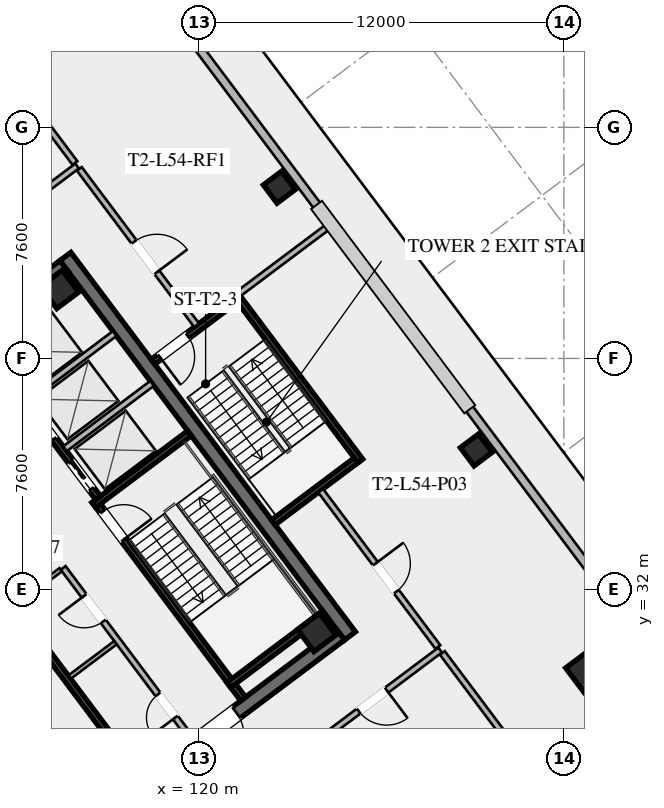
"""IFC4 building model, lengths in metres.
Left out: names, types, materials, properties, quantities, classifications, styles, units other than length and angle.
Written with IfcOpenShell. Run it as: python <this file> out.ifc"""

import sys

from ifc_helpers import new_model, si_unit, direction, frame, frame_2d, origin, origin_2d, place, context, subcontext, project, spatial, rectangle, hollow_rectangle, extrude, element, fill, save


model = new_model("IFC4")
c1 = context("Model", 3, precision=1e-05, world=origin(), true_north=direction((0.0, 1.0)))
c2 = subcontext(c1, "Body", "Model", "MODEL_VIEW")
j1 = project(units=[si_unit("LENGTHUNIT", "METRE"), si_unit("PLANEANGLEUNIT", "RADIAN")], contexts=[c1])
p1 = place(None, origin())
s1 = spatial("IfcSite", under=j1, at=p1, CompositionType="ELEMENT")
p2 = place(p1, origin())
s2 = spatial("IfcBuilding", under=s1, at=p2, CompositionType="ELEMENT")
p3 = place(p2, frame((0.0, 0.0, 199.6)))
s3 = spatial("IfcBuildingStorey", under=s2, at=p3, CompositionType="ELEMENT", Elevation=199.6)
p4 = place(p3, frame((115.604, 42.953, 0.0), z_axis=(0.0, 0.0, 1.0), x_axis=(0.600005007985, -0.799996243986, 0.0)))
e1 = element("IfcWall", 1, at=p4, inside=s3, PredefinedType="SHEAR", context=c2, shape_type="SweptSolid", body=[
    extrude(rectangle(XDim=15.6, YDim=0.45, at=frame_2d((7.8, 0.0))), origin(), (0.0, 0.0, 1.0), 4.6),
])
p5 = place(p3, frame((124.649, 30.518, 0.0), z_axis=(0.0, 0.0, 1.0), x_axis=(-0.8, -0.6, 0.0)))
e2 = element("IfcWall", 2, at=p5, inside=s3, PredefinedType="SHEAR", context=c2, shape_type="SweptSolid", body=[
    extrude(rectangle(XDim=15.26, YDim=0.45, at=frame_2d((7.63, 0.0))), origin(), (0.0, 0.0, 1.0), 4.6),
])
p6 = place(p5, frame((9.33, 0.0, 0.0)))
e3 = element("IfcOpeningElement", 3, at=p6, cuts=e2, PredefinedType="OPENING", context=c2, shape_type="SweptSolid", body=[
    extrude(rectangle(XDim=1.25, YDim=2.25, at=frame_2d((0.625, 1.125))), frame((0.0, 0.235, 0.0), z_axis=(0.0, -1.0, 0.0), x_axis=(1.0, 0.0, 0.0)), (0.0, 0.0, 1.0), 0.47),
])
p7 = place(p5, frame((4.28, 0.0, 0.0)))
e4 = element("IfcOpeningElement", 4, at=p7, cuts=e2, PredefinedType="OPENING", context=c2, shape_type="SweptSolid", body=[
    extrude(rectangle(XDim=1.25, YDim=2.25, at=frame_2d((0.625, 1.125))), frame((0.0, 0.235, 0.0), z_axis=(0.0, -1.0, 0.0), x_axis=(1.0, 0.0, 0.0)), (0.0, 0.0, 1.0), 0.47),
])
p8 = place(p3, frame((103.351, 33.482, 0.0), z_axis=(0.0, 0.0, 1.0), x_axis=(0.8, 0.6, 0.0)))
e5 = element("IfcWall", 5, at=p8, inside=s3, PredefinedType="SHEAR", context=c2, shape_type="SweptSolid", body=[
    extrude(rectangle(XDim=15.26, YDim=0.45, at=frame_2d((7.63, 0.0))), origin(), (0.0, 0.0, 1.0), 4.6),
])
p9 = place(p8, frame((4.68, 0.0, 0.0)))
e6 = element("IfcOpeningElement", 6, at=p9, cuts=e5, PredefinedType="OPENING", context=c2, shape_type="SweptSolid", body=[
    extrude(rectangle(XDim=1.25, YDim=2.25, at=frame_2d((0.625, 1.125))), frame((0.0, 0.235, 0.0), z_axis=(0.0, -1.0, 0.0), x_axis=(1.0, 0.0, 0.0)), (0.0, 0.0, 1.0), 0.47),
])
p10 = place(p8, frame((9.73, 0.0, 0.0)))
e7 = element("IfcOpeningElement", 7, at=p10, cuts=e5, PredefinedType="OPENING", context=c2, shape_type="SweptSolid", body=[
    extrude(rectangle(XDim=1.25, YDim=2.25, at=frame_2d((0.625, 1.125))), frame((0.0, 0.235, 0.0), z_axis=(0.0, -1.0, 0.0), x_axis=(1.0, 0.0, 0.0)), (0.0, 0.0, 1.0), 0.47),
])
for number, where, z_axis, x_axis in (
    (8, (123.87, 30.59, 0.0), (0.0, 0.0, 1.0), (0.8, 0.6, 0.0)),
    (9, (115.41, 41.87, 0.0), (0.0, 0.0, 1.0), (0.8, 0.6, 0.0)),
):
    element("IfcColumn", number, at=place(p3, frame(where, z_axis=z_axis, x_axis=x_axis)), inside=s3, PredefinedType="COLUMN", context=c2, shape_type="SweptSolid", body=[
        extrude(hollow_rectangle(XDim=0.9, YDim=0.9, WallThickness=0.04, at=origin_2d()), origin(), (0.0, 0.0, 1.0), 4.42),
    ])
p11 = place(p3, frame((132.76, 29.32, -0.295), z_axis=(0.0, 0.0, 1.0), x_axis=(0.799999996291, 0.600000004945, 0.0)))
e10 = element("IfcColumn", 10, at=p11, inside=s3, PredefinedType="COLUMN", context=c2, shape_type="SweptSolid", body=[
    extrude(hollow_rectangle(XDim=1.0, YDim=1.0, WallThickness=0.04, at=origin_2d()), origin(), (0.0, 0.0, 1.0), 4.715),
])
for number, where, z_axis, x_axis in (
    (11, (129.12, 36.59, -0.295), (0.0, 0.0, 1.0), (0.8, 0.6, 0.0)),
    (12, (122.64, 45.23, -0.295), (0.0, 0.0, 1.0), (0.8, 0.6, 0.0)),
):
    element("IfcColumn", number, at=place(p3, frame(where, z_axis=z_axis, x_axis=x_axis)), inside=s3, PredefinedType="COLUMN", context=c2, shape_type="SweptSolid", body=[
        extrude(hollow_rectangle(XDim=0.75, YDim=0.75, WallThickness=0.032, at=origin_2d()), origin(), (0.0, 0.0, 1.0), 4.715),
    ])
for number, where, z_axis, x_axis in (
    (13, (134.072, 27.704, 0.0), (0.0, 0.0, 1.0), (-0.8, -0.6, 0.0)),
    (14, (93.928, 36.296, 0.0), (0.0, 0.0, 1.0), (0.8, 0.6, 0.0)),
    (15, (118.296, 52.072, 0.0), (0.0, 0.0, 1.0), (0.6, -0.8, 0.0)),
):
    element("IfcWall", number, at=place(p3, frame(where, z_axis=z_axis, x_axis=x_axis)), inside=s3, PredefinedType="SOLIDWALL", context=c2, shape_type="SweptSolid", body=[
        extrude(rectangle(XDim=26.96, YDim=0.28, at=frame_2d((13.48, 0.0))), origin(), (0.0, 0.0, 1.0), 4.42),
    ])
p12 = place(p3, frame((116.56, 34.92, 0.0), z_axis=(0.0, 0.0, 1.0), x_axis=(0.59999041401, -0.800007189403, 0.0)))
e16 = element("IfcWall", 16, at=p12, inside=s3, PredefinedType="SHEAR", context=c2, shape_type="SweptSolid", body=[
    extrude(rectangle(XDim=8.15, YDim=0.2, at=frame_2d((4.075, 0.0))), origin(), (0.0, 0.0, 1.0), 4.42),
])
p13 = place(p12, frame((0.45, 0.0, 0.0)))
e17 = element("IfcOpeningElement", 17, at=p13, cuts=e16, PredefinedType="OPENING", context=c2, shape_type="SweptSolid", body=[
    extrude(rectangle(XDim=1.15, YDim=2.2, at=frame_2d((0.575, 1.1))), frame((0.0, 0.11, 0.0), z_axis=(0.0, -1.0, 0.0), x_axis=(1.0, 0.0, 0.0)), (0.0, 0.0, 1.0), 0.22),
])
for number, where, z_axis, x_axis in (
    (18, (116.54, 34.78, 0.0), (0.0, 0.0, 1.0), (0.8, 0.6, 0.0)),
    (19, (120.98, 28.86, 0.0), (0.0, 0.0, 1.0), (0.8, 0.6, 0.0)),
):
    element("IfcWall", number, at=place(p3, frame(where, z_axis=z_axis, x_axis=x_axis)), inside=s3, PredefinedType="SHEAR", context=c2, shape_type="SweptSolid", body=[
        extrude(rectangle(XDim=3.93, YDim=0.2, at=frame_2d((1.965, 0.0))), origin(), (0.0, 0.0, 1.0), 4.42),
    ])
p14 = place(p3, frame((118.058, 25.856, 0.0), z_axis=(0.0, 0.0, 1.0), x_axis=(-0.600002657301, 0.799998007018, 0.0)))
e20 = element("IfcWall", 20, at=p14, inside=s3, PredefinedType="SHEAR", context=c2, shape_type="SweptSolid", body=[
    extrude(rectangle(XDim=14.7, YDim=0.2, at=frame_2d((7.35, 0.0))), origin(), (0.0, 0.0, 1.0), 4.42),
])
p15 = place(p3, frame((115.25, 23.75, 0.0), z_axis=(0.0, 0.0, 1.0), x_axis=(-0.599994036198, 0.800004472816, 0.0)))
e21 = element("IfcWall", 21, at=p15, inside=s3, PredefinedType="SHEAR", context=c2, shape_type="SweptSolid", body=[
    extrude(rectangle(XDim=6.55, YDim=0.2, at=frame_2d((3.275, 0.0))), origin(), (0.0, 0.0, 1.0), 4.42),
])
p16 = place(p15, frame((4.975, 0.0, 0.0)))
e22 = element("IfcOpeningElement", 22, at=p16, cuts=e21, PredefinedType="OPENING", context=c2, shape_type="SweptSolid", body=[
    extrude(rectangle(XDim=1.3, YDim=2.25, at=frame_2d((0.65, 1.125))), frame((0.0, 0.11, 0.0), z_axis=(0.0, -1.0, 0.0), x_axis=(1.0, 0.0, 0.0)), (0.0, 0.0, 1.0), 0.22),
])
p17 = place(p15, frame((2.975, 0.0, 0.0)))
e23 = element("IfcOpeningElement", 23, at=p17, cuts=e21, PredefinedType="OPENING", context=c2, shape_type="SweptSolid", body=[
    extrude(rectangle(XDim=1.3, YDim=2.25, at=frame_2d((0.65, 1.125))), frame((0.0, 0.11, 0.0), z_axis=(0.0, -1.0, 0.0), x_axis=(1.0, 0.0, 0.0)), (0.0, 0.0, 1.0), 0.22),
])
p18 = place(p15, frame((0.775, 0.0, 0.0)))
e24 = element("IfcOpeningElement", 24, at=p18, cuts=e21, PredefinedType="OPENING", context=c2, shape_type="SweptSolid", body=[
    extrude(rectangle(XDim=1.3, YDim=2.25, at=frame_2d((0.65, 1.125))), frame((0.0, 0.11, 0.0), z_axis=(0.0, -1.0, 0.0), x_axis=(1.0, 0.0, 0.0)), (0.0, 0.0, 1.0), 0.22),
])
p19 = place(p3, frame((112.75, 40.25, 0.0), z_axis=(0.0, 0.0, 1.0), x_axis=(0.599994036198, -0.800004472816, 0.0)))
e25 = element("IfcWall", 25, at=p19, inside=s3, PredefinedType="SHEAR", context=c2, shape_type="SweptSolid", body=[
    extrude(rectangle(XDim=6.55, YDim=0.2, at=frame_2d((3.275, 0.0))), origin(), (0.0, 0.0, 1.0), 4.42),
])
p20 = place(p19, frame((5.075, 0.0, 0.0)))
e26 = element("IfcOpeningElement", 26, at=p20, cuts=e25, PredefinedType="OPENING", context=c2, shape_type="SweptSolid", body=[
    extrude(rectangle(XDim=1.1, YDim=2.2, at=frame_2d((0.55, 1.1))), frame((0.0, 0.11, 0.0), z_axis=(0.0, -1.0, 0.0), x_axis=(1.0, 0.0, 0.0)), (0.0, 0.0, 1.0), 0.22),
])
p21 = place(p19, frame((3.025, 0.0, 0.0)))
e27 = element("IfcOpeningElement", 27, at=p21, cuts=e25, PredefinedType="OPENING", context=c2, shape_type="SweptSolid", body=[
    extrude(rectangle(XDim=1.1, YDim=2.2, at=frame_2d((0.55, 1.1))), frame((0.0, 0.11, 0.0), z_axis=(0.0, -1.0, 0.0), x_axis=(1.0, 0.0, 0.0)), (0.0, 0.0, 1.0), 0.22),
])
p22 = place(p19, frame((1.025, 0.0, 0.0)))
e28 = element("IfcOpeningElement", 28, at=p22, cuts=e25, PredefinedType="OPENING", context=c2, shape_type="SweptSolid", body=[
    extrude(rectangle(XDim=1.1, YDim=2.2, at=frame_2d((0.55, 1.1))), frame((0.0, 0.11, 0.0), z_axis=(0.0, -1.0, 0.0), x_axis=(1.0, 0.0, 0.0)), (0.0, 0.0, 1.0), 0.22),
])
for number, where, z_axis, x_axis in (
    (29, (115.59, 36.63, 0.0), (0.0, 0.0, 1.0), (0.8, 0.6, 0.0)),
    (30, (114.36, 38.27, 0.0), (0.0, 0.0, 1.0), (0.8, 0.6, 0.0)),
):
    element("IfcWall", number, at=place(p3, frame(where, z_axis=z_axis, x_axis=x_axis)), inside=s3, PredefinedType="SOLIDWALL", context=c2, shape_type="SweptSolid", body=[
        extrude(rectangle(XDim=3.58, YDim=0.2, at=frame_2d((1.79, 0.0))), origin(), (0.0, 0.0, 1.0), 4.42),
    ])
p23 = place(p3, frame((119.73, 27.11, 0.0), z_axis=(0.0, 0.0, 1.0), x_axis=(-0.600005580459, 0.799995814625, 0.0)))
e31 = element("IfcWall", 31, at=p23, inside=s3, PredefinedType="SOLIDWALL", context=c2, shape_type="SweptSolid", body=[
    extrude(rectangle(XDim=7.0, YDim=0.2, at=frame_2d((3.5, 0.0))), origin(), (0.0, 0.0, 1.0), 3.531),
])
p24 = place(p23, frame((0.85, 0.0, 0.0)))
e32 = element("IfcOpeningElement", 32, at=p24, cuts=e31, PredefinedType="OPENING", context=c2, shape_type="SweptSolid", body=[
    extrude(rectangle(XDim=0.95, YDim=2.05, at=frame_2d((0.475, 1.025))), frame((0.0, 0.11, 0.0), z_axis=(0.0, -1.0, 0.0), x_axis=(1.0, 0.0, 0.0)), (0.0, 0.0, 1.0), 0.22),
])
p25 = place(p23, frame((4.8, 0.0, 0.0)))
e33 = element("IfcOpeningElement", 33, at=p25, cuts=e31, PredefinedType="OPENING", context=c2, shape_type="SweptSolid", body=[
    extrude(rectangle(XDim=1.05, YDim=2.2, at=frame_2d((0.525, 1.1))), frame((0.0, 0.11, 0.0), z_axis=(0.0, -1.0, 0.0), x_axis=(1.0, 0.0, 0.0)), (0.0, 0.0, 1.0), 0.22),
])
for number, where, z_axis, x_axis in (
    (34, (113.946, 31.522, 0.0), (0.0, 0.0, 1.0), (0.8, 0.6, 0.0)),
    (35, (115.746, 29.122, 0.0), (0.0, 0.0, 1.0), (0.8, 0.6, 0.0)),
):
    element("IfcWall", number, at=place(p3, frame(where, z_axis=z_axis, x_axis=x_axis)), inside=s3, PredefinedType="PARTITIONING", context=c2, shape_type="SweptSolid", body=[
        extrude(rectangle(XDim=1.88, YDim=0.135, at=frame_2d((0.94, 0.0))), origin(), (0.0, 0.0, 1.0), 3.531),
    ])
p26 = place(p3, frame((115.11, 33.27, 0.0), z_axis=(0.0, 0.0, 1.0), x_axis=(-0.600011160345, 0.79999162962, 0.0)))
e36 = element("IfcWall", 36, at=p26, inside=s3, PredefinedType="SOLIDWALL", context=c2, shape_type="SweptSolid", body=[
    extrude(rectangle(XDim=7.0, YDim=0.2, at=frame_2d((3.5, 0.0))), origin(), (0.0, 0.0, 1.0), 4.42),
])
p27 = place(p3, frame((125.304, 36.228, 0.0), z_axis=(0.0, 0.0, 1.0), x_axis=(-0.59998851072, 0.800008616831, 0.0)))
e37 = element("IfcWall", 37, at=p27, inside=s3, PredefinedType="SHEAR", context=c2, shape_type="SweptSolid", body=[
    extrude(rectangle(XDim=6.8, YDim=0.2, at=frame_2d((3.4, 0.0))), origin(), (0.0, 0.0, 1.0), 4.42),
])
p28 = place(p3, frame((121.204, 41.528, 0.0), z_axis=(0.0, 0.0, 1.0), x_axis=(-0.800017232136, -0.599977023131, 0.0)))
e38 = element("IfcWall", 38, at=p28, inside=s3, PredefinedType="SHEAR", context=c2, shape_type="SweptSolid", body=[
    extrude(rectangle(XDim=3.4, YDim=0.2, at=frame_2d((1.7, 0.0))), origin(), (0.0, 0.0, 1.0), 4.42),
])
p29 = place(p28, frame((1.975, 0.0, 0.0)))
e39 = element("IfcOpeningElement", 39, at=p29, cuts=e38, PredefinedType="OPENING", context=c2, shape_type="SweptSolid", body=[
    extrude(rectangle(XDim=1.15, YDim=2.2, at=frame_2d((0.575, 1.1))), frame((0.0, 0.11, 0.0), z_axis=(0.0, -1.0, 0.0), x_axis=(1.0, 0.0, 0.0)), (0.0, 0.0, 1.0), 0.22),
])
p30 = place(p3, frame((122.444, 34.208, 0.0), z_axis=(0.0, 0.0, 1.0), x_axis=(0.79999138319, 0.600011488909, 0.0)))
e40 = element("IfcWall", 40, at=p30, inside=s3, PredefinedType="SHEAR", context=c2, shape_type="SweptSolid", body=[
    extrude(rectangle(XDim=3.4, YDim=0.2, at=frame_2d((1.7, 0.0))), origin(), (0.0, 0.0, 1.0), 4.42),
])
p31 = place(p3, frame((100.07, 33.99, 0.0), z_axis=(0.0, 0.0, 1.0), x_axis=(0.8, 0.6, 0.0)))
e41 = element("IfcWall", 41, at=p31, inside=s3, PredefinedType="SOLIDWALL", context=c2, shape_type="SweptSolid", body=[
    extrude(rectangle(XDim=19.9, YDim=0.2, at=frame_2d((9.95, 0.0))), origin(), (0.0, 0.0, 1.0), 3.531),
])
p32 = place(p31, frame((2.2, 0.0, 0.0)))
e42 = element("IfcOpeningElement", 42, at=p32, cuts=e41, PredefinedType="OPENING", context=c2, shape_type="SweptSolid", body=[
    extrude(rectangle(XDim=1.15, YDim=2.2, at=frame_2d((0.575, 1.1))), frame((0.0, 0.11, 0.0), z_axis=(0.0, -1.0, 0.0), x_axis=(1.0, 0.0, 0.0)), (0.0, 0.0, 1.0), 0.22),
])
p33 = place(p3, frame((127.93, 30.01, 0.0), z_axis=(0.0, 0.0, 1.0), x_axis=(-0.8, -0.6, 0.0)))
e43 = element("IfcWall", 43, at=p33, inside=s3, PredefinedType="SOLIDWALL", context=c2, shape_type="SweptSolid", body=[
    extrude(rectangle(XDim=19.9, YDim=0.2, at=frame_2d((9.95, 0.0))), origin(), (0.0, 0.0, 1.0), 3.531),
])
p34 = place(p33, frame((2.2, 0.0, 0.0)))
e44 = element("IfcOpeningElement", 44, at=p34, cuts=e43, PredefinedType="OPENING", context=c2, shape_type="SweptSolid", body=[
    extrude(rectangle(XDim=1.15, YDim=2.2, at=frame_2d((0.575, 1.1))), frame((0.0, 0.11, 0.0), z_axis=(0.0, -1.0, 0.0), x_axis=(1.0, 0.0, 0.0)), (0.0, 0.0, 1.0), 0.22),
])
p35 = place(p3, frame((116.062, 45.834, 0.0), z_axis=(0.0, 0.0, 1.0), x_axis=(0.599987849816, -0.800009112494, 0.0)))
e45 = element("IfcWall", 45, at=p35, inside=s3, PredefinedType="SOLIDWALL", context=c2, shape_type="SweptSolid", body=[
    extrude(rectangle(XDim=6.43, YDim=0.2, at=frame_2d((3.215, 0.0))), origin(), (0.0, 0.0, 1.0), 3.531),
])
p36 = place(p35, frame((3.0, 0.0, 0.0)))
e46 = element("IfcOpeningElement", 46, at=p36, cuts=e45, PredefinedType="OPENING", context=c2, shape_type="SweptSolid", body=[
    extrude(rectangle(XDim=1.25, YDim=2.25, at=frame_2d((0.625, 1.125))), frame((0.0, 0.11, 0.0), z_axis=(0.0, -1.0, 0.0), x_axis=(1.0, 0.0, 0.0)), (0.0, 0.0, 1.0), 0.22),
])
p37 = place(p3, frame((124.0, 35.25, 0.0), z_axis=(0.0, 0.0, 1.0), x_axis=(0.599987849816, -0.800009112494, 0.0)))
e47 = element("IfcWall", 47, at=p37, inside=s3, PredefinedType="SOLIDWALL", context=c2, shape_type="SweptSolid", body=[
    extrude(rectangle(XDim=6.43, YDim=0.2, at=frame_2d((3.215, 0.0))), origin(), (0.0, 0.0, 1.0), 3.531),
])
p38 = place(p37, frame((3.0, 0.0, 0.0)))
e48 = element("IfcOpeningElement", 48, at=p38, cuts=e47, PredefinedType="OPENING", context=c2, shape_type="SweptSolid", body=[
    extrude(rectangle(XDim=1.15, YDim=2.2, at=frame_2d((0.575, 1.1))), frame((0.0, 0.11, 0.0), z_axis=(0.0, -1.0, 0.0), x_axis=(1.0, 0.0, 0.0)), (0.0, 0.0, 1.0), 0.22),
])
p39 = place(p3, frame((115.918, 46.026, 0.0), z_axis=(0.0, 0.0, 1.0), x_axis=(-0.599971117961, 0.800021660715, 0.0)))
e49 = element("IfcWall", 49, at=p39, inside=s3, PredefinedType="SOLIDWALL", context=c2, shape_type="SweptSolid", body=[
    extrude(rectangle(XDim=5.41, YDim=0.2, at=frame_2d((2.705, 0.0))), origin(), (0.0, 0.0, 1.0), 3.531),
])
p40 = place(p3, frame((128.002, 29.914, 0.0), z_axis=(0.0, 0.0, 1.0), x_axis=(0.6, -0.8, 0.0)))
e50 = element("IfcWall", 50, at=p40, inside=s3, PredefinedType="SOLIDWALL", context=c2, shape_type="SweptSolid", body=[
    extrude(rectangle(XDim=5.41, YDim=0.2, at=frame_2d((2.705, 0.0))), origin(), (0.0, 0.0, 1.0), 3.531),
])
p41 = place(p3, frame((121.304, 41.728, 0.0), z_axis=(0.0, 0.0, 1.0), x_axis=(0.8, 0.6, 0.0)))
e51 = element("IfcWall", 51, at=p41, inside=s3, PredefinedType="SOLIDWALL", context=c2, shape_type="SweptSolid", body=[
    extrude(rectangle(XDim=3.8, YDim=0.2, at=frame_2d((1.9, 0.0))), origin(), (0.0, 0.0, 1.0), 3.531),
])
p42 = place(p7, origin())
e52 = element("IfcDoor", 52, at=p42, inside=s3, OperationType="SINGLE_SWING_RIGHT", PredefinedType="DOOR", context=c2, shape_type="SweptSolid", body=[
    extrude(rectangle(XDim=1.25, YDim=2.25, at=frame_2d((0.625, 1.125))), frame((0.0, 0.025, 0.0), z_axis=(0.0, -1.0, 0.0), x_axis=(1.0, 0.0, 0.0)), (0.0, 0.0, 1.0), 0.05),
])
fill(e4, e52)
p43 = place(p13, origin())
e53 = element("IfcDoor", 53, at=p43, inside=s3, OperationType="SINGLE_SWING_RIGHT", PredefinedType="DOOR", context=c2, shape_type="SweptSolid", body=[
    extrude(rectangle(XDim=1.15, YDim=2.2, at=frame_2d((0.575, 1.1))), frame((0.0, 0.025, 0.0), z_axis=(0.0, -1.0, 0.0), x_axis=(1.0, 0.0, 0.0)), (0.0, 0.0, 1.0), 0.05),
])
fill(e17, e53)
p44 = place(p24, origin())
e54 = element("IfcDoor", 54, at=p44, inside=s3, OperationType="SINGLE_SWING_LEFT", PredefinedType="DOOR", context=c2, shape_type="SweptSolid", body=[
    extrude(rectangle(XDim=0.95, YDim=2.05, at=frame_2d((0.475, 1.025))), frame((0.0, 0.025, 0.0), z_axis=(0.0, -1.0, 0.0), x_axis=(1.0, 0.0, 0.0)), (0.0, 0.0, 1.0), 0.05),
])
fill(e32, e54)
p45 = place(p25, origin())
e55 = element("IfcDoor", 55, at=p45, inside=s3, OperationType="SINGLE_SWING_RIGHT", PredefinedType="DOOR", context=c2, shape_type="SweptSolid", body=[
    extrude(rectangle(XDim=1.05, YDim=2.2, at=frame_2d((0.525, 1.1))), frame((0.0, 0.025, 0.0), z_axis=(0.0, -1.0, 0.0), x_axis=(1.0, 0.0, 0.0)), (0.0, 0.0, 1.0), 0.05),
])
fill(e33, e55)
p46 = place(p29, origin())
e56 = element("IfcDoor", 56, at=p46, inside=s3, OperationType="SINGLE_SWING_RIGHT", PredefinedType="DOOR", context=c2, shape_type="SweptSolid", body=[
    extrude(rectangle(XDim=1.15, YDim=2.2, at=frame_2d((0.575, 1.1))), frame((0.0, 0.025, 0.0), z_axis=(0.0, -1.0, 0.0), x_axis=(1.0, 0.0, 0.0)), (0.0, 0.0, 1.0), 0.05),
])
fill(e39, e56)
p47 = place(p34, origin())
e57 = element("IfcDoor", 57, at=p47, inside=s3, OperationType="SINGLE_SWING_LEFT", PredefinedType="DOOR", context=c2, shape_type="SweptSolid", body=[
    extrude(rectangle(XDim=1.15, YDim=2.2, at=frame_2d((0.575, 1.1))), frame((0.0, 0.025, 0.0), z_axis=(0.0, -1.0, 0.0), x_axis=(1.0, 0.0, 0.0)), (0.0, 0.0, 1.0), 0.05),
])
fill(e44, e57)
p48 = place(p36, origin())
e58 = element("IfcDoor", 58, at=p48, inside=s3, OperationType="SINGLE_SWING_RIGHT", PredefinedType="DOOR", context=c2, shape_type="SweptSolid", body=[
    extrude(rectangle(XDim=1.25, YDim=2.25, at=frame_2d((0.625, 1.125))), frame((0.0, 0.025, 0.0), z_axis=(0.0, -1.0, 0.0), x_axis=(1.0, 0.0, 0.0)), (0.0, 0.0, 1.0), 0.05),
])
fill(e46, e58)
p49 = place(p38, origin())
e59 = element("IfcDoor", 59, at=p49, inside=s3, OperationType="SINGLE_SWING_LEFT", PredefinedType="DOOR", context=c2, shape_type="SweptSolid", body=[
    extrude(rectangle(XDim=1.15, YDim=2.2, at=frame_2d((0.575, 1.1))), frame((0.0, 0.025, 0.0), z_axis=(0.0, -1.0, 0.0), x_axis=(1.0, 0.0, 0.0)), (0.0, 0.0, 1.0), 0.05),
])
fill(e48, e59)
p50 = place(p20, origin())
e60 = element("IfcDoor", 60, at=p50, inside=s3, OperationType="SLIDING_TO_LEFT", PredefinedType="DOOR", context=c2, shape_type="SweptSolid", body=[
    extrude(rectangle(XDim=1.1, YDim=2.2, at=frame_2d((0.55, 1.1))), frame((0.0, 0.025, 0.0), z_axis=(0.0, -1.0, 0.0), x_axis=(1.0, 0.0, 0.0)), (0.0, 0.0, 1.0), 0.05),
])
fill(e26, e60)
p51 = place(p21, origin())
e61 = element("IfcDoor", 61, at=p51, inside=s3, OperationType="SLIDING_TO_LEFT", PredefinedType="DOOR", context=c2, shape_type="SweptSolid", body=[
    extrude(rectangle(XDim=1.1, YDim=2.2, at=frame_2d((0.55, 1.1))), frame((0.0, 0.025, 0.0), z_axis=(0.0, -1.0, 0.0), x_axis=(1.0, 0.0, 0.0)), (0.0, 0.0, 1.0), 0.05),
])
fill(e27, e61)
save(model, sys.argv[1])
